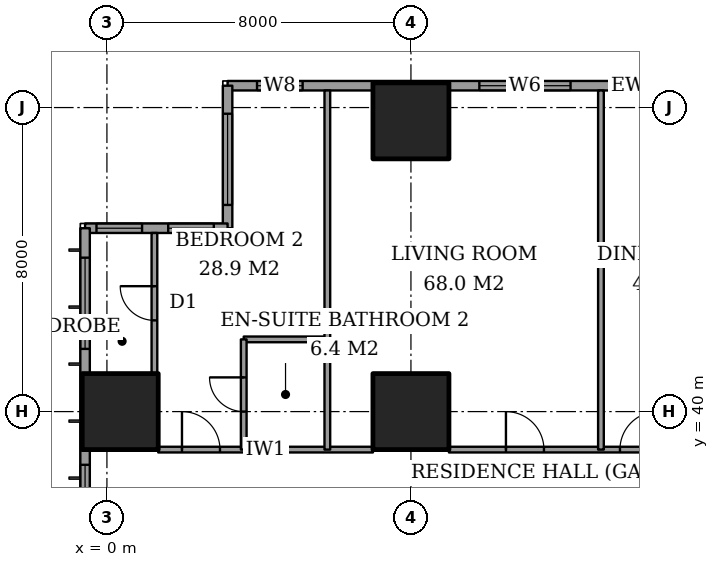
"""IFC4 building model, lengths in metres.
Left out: names, types, materials, properties, quantities, classifications, styles, units other than length and angle.
Written with IfcOpenShell. Run it as: python <this file> out.ifc"""

import sys

from ifc_helpers import new_model, si_unit, direction, frame, frame_2d, origin, origin_2d, place, context, subcontext, project, spatial, rectangle, extrude, element, fill, save


model = new_model("IFC4")
c1 = context("Model", 3, precision=1e-05, world=origin(), true_north=direction((0.0, 1.0)))
c2 = subcontext(c1, "Body", "Model", "MODEL_VIEW")
j1 = project(units=[si_unit("LENGTHUNIT", "METRE"), si_unit("PLANEANGLEUNIT", "RADIAN")], contexts=[c1])
p1 = place(None, origin())
s1 = spatial("IfcSite", under=j1, at=p1, CompositionType="ELEMENT")
p2 = place(p1, origin())
s2 = spatial("IfcBuilding", under=s1, at=p2, CompositionType="ELEMENT")
p3 = place(p2, frame((0.0, 0.0, 29.6)))
s3 = spatial("IfcBuildingStorey", under=s2, at=p3, CompositionType="ELEMENT", Elevation=29.6)
for number, where, z_axis, x_axis in (
    (1, (0.35, 40.0, 0.0), (0.0, 0.0, 1.0), (1.0, 0.0, 0.0)),
    (2, (8.0, 40.0, 0.0), (0.0, 0.0, 1.0), (1.0, 0.0, 0.0)),
    (3, (8.0, 47.65, 0.0), (0.0, 0.0, 1.0), (1.0, 0.0, 0.0)),
):
    element("IfcColumn", number, at=place(p3, frame(where, z_axis=z_axis, x_axis=x_axis)), inside=s3, PredefinedType="COLUMN", context=c2, shape_type="SweptSolid", body=[
        extrude(rectangle(XDim=2.0, YDim=2.0, at=origin_2d()), origin(), (0.0, 0.0, 1.0), 3.6),
    ])
p4 = place(p3, frame((24.575, 48.575, 0.0), z_axis=(0.0, 0.0, 1.0), x_axis=(-1.0, 0.0, 0.0)))
e4 = element("IfcWall", 4, at=p4, inside=s3, PredefinedType="SOLIDWALL", context=c2, shape_type="SweptSolid", body=[
    extrude(rectangle(XDim=21.4, YDim=0.25, at=frame_2d((10.7, 0.0))), origin(), (0.0, 0.0, 1.0), 3.6),
])
p5 = place(p4, frame((3.125, 0.0, 0.6)))
e5 = element("IfcOpeningElement", 5, at=p5, cuts=e4, PredefinedType="OPENING", context=c2, shape_type="SweptSolid", body=[
    extrude(rectangle(XDim=2.4, YDim=2.0, at=frame_2d((1.2, 1.0))), frame((0.0, 0.135, 0.0), z_axis=(0.0, -1.0, 0.0), x_axis=(1.0, 0.0, 0.0)), (0.0, 0.0, 1.0), 0.27),
])
p6 = place(p4, frame((9.975, 0.0, 0.6)))
e6 = element("IfcOpeningElement", 6, at=p6, cuts=e4, PredefinedType="OPENING", context=c2, shape_type="SweptSolid", body=[
    extrude(rectangle(XDim=1.2, YDim=2.0, at=frame_2d((0.6, 1.0))), frame((0.0, 0.135, 0.0), z_axis=(0.0, -1.0, 0.0), x_axis=(1.0, 0.0, 0.0)), (0.0, 0.0, 1.0), 0.27),
])
p7 = place(p4, frame((12.375, 0.0, 0.6)))
e7 = element("IfcOpeningElement", 7, at=p7, cuts=e4, PredefinedType="OPENING", context=c2, shape_type="SweptSolid", body=[
    extrude(rectangle(XDim=2.4, YDim=2.0, at=frame_2d((1.2, 1.0))), frame((0.0, 0.135, 0.0), z_axis=(0.0, -1.0, 0.0), x_axis=(1.0, 0.0, 0.0)), (0.0, 0.0, 1.0), 0.27),
])
p8 = place(p4, frame((19.425, 0.0, 0.6)))
e8 = element("IfcOpeningElement", 8, at=p8, cuts=e4, PredefinedType="OPENING", context=c2, shape_type="SweptSolid", body=[
    extrude(rectangle(XDim=1.2, YDim=2.0, at=frame_2d((0.6, 1.0))), frame((0.0, 0.135, 0.0), z_axis=(0.0, -1.0, 0.0), x_axis=(1.0, 0.0, 0.0)), (0.0, 0.0, 1.0), 0.27),
])
p9 = place(p3, frame((3.175, 48.575, 0.0), z_axis=(0.0, 0.0, 1.0), x_axis=(0.0, -1.0, 0.0)))
e9 = element("IfcWall", 9, at=p9, inside=s3, PredefinedType="SOLIDWALL", context=c2, shape_type="SweptSolid", body=[
    extrude(rectangle(XDim=3.75, YDim=0.25, at=frame_2d((1.875, 0.0))), origin(), (0.0, 0.0, 1.0), 3.6),
])
p10 = place(p9, frame((0.738, 0.0, 0.6)))
e10 = element("IfcOpeningElement", 10, at=p10, cuts=e9, PredefinedType="OPENING", context=c2, shape_type="SweptSolid", body=[
    extrude(rectangle(XDim=2.4, YDim=2.0, at=frame_2d((1.2, 1.0))), frame((0.0, 0.135, 0.0), z_axis=(0.0, -1.0, 0.0), x_axis=(1.0, 0.0, 0.0)), (0.0, 0.0, 1.0), 0.27),
])
p11 = place(p3, frame((3.175, 44.825, 0.0), z_axis=(0.0, 0.0, 1.0), x_axis=(-1.0, 0.0, 0.0)))
e11 = element("IfcWall", 11, at=p11, inside=s3, PredefinedType="SOLIDWALL", context=c2, shape_type="SweptSolid", body=[
    extrude(rectangle(XDim=3.75, YDim=0.25, at=frame_2d((1.875, 0.0))), origin(), (0.0, 0.0, 1.0), 3.6),
])
p12 = place(p11, frame((0.363, 0.0, 0.6)))
e12 = element("IfcOpeningElement", 12, at=p12, cuts=e11, PredefinedType="OPENING", context=c2, shape_type="SweptSolid", body=[
    extrude(rectangle(XDim=1.2, YDim=2.0, at=frame_2d((0.6, 1.0))), frame((0.0, 0.135, 0.0), z_axis=(0.0, -1.0, 0.0), x_axis=(1.0, 0.0, 0.0)), (0.0, 0.0, 1.0), 0.27),
])
p13 = place(p11, frame((2.25, 0.0, 0.6)))
e13 = element("IfcOpeningElement", 13, at=p13, cuts=e11, PredefinedType="OPENING", context=c2, shape_type="SweptSolid", body=[
    extrude(rectangle(XDim=1.2, YDim=2.0, at=frame_2d((0.6, 1.0))), frame((0.0, 0.135, 0.0), z_axis=(0.0, -1.0, 0.0), x_axis=(1.0, 0.0, 0.0)), (0.0, 0.0, 1.0), 0.27),
])
p14 = place(p3, frame((-0.575, 44.825, 0.0), z_axis=(0.0, 0.0, 1.0), x_axis=(0.0, -1.0, 0.0)))
e14 = element("IfcWall", 14, at=p14, inside=s3, PredefinedType="SOLIDWALL", context=c2, shape_type="SweptSolid", body=[
    extrude(rectangle(XDim=41.65, YDim=0.25, at=frame_2d((20.825, 0.0))), origin(), (0.0, 0.0, 1.0), 3.6),
])
p15 = place(p14, frame((0.775, 0.0, 0.6)))
e15 = element("IfcOpeningElement", 15, at=p15, cuts=e14, PredefinedType="OPENING", context=c2, shape_type="SweptSolid", body=[
    extrude(rectangle(XDim=2.4, YDim=2.0, at=frame_2d((1.2, 1.0))), frame((0.0, 0.135, 0.0), z_axis=(0.0, -1.0, 0.0), x_axis=(1.0, 0.0, 0.0)), (0.0, 0.0, 1.0), 0.27),
])
p16 = place(p14, frame((6.225, 0.0, 0.6)))
e16 = element("IfcOpeningElement", 16, at=p16, cuts=e14, PredefinedType="OPENING", context=c2, shape_type="SweptSolid", body=[
    extrude(rectangle(XDim=1.2, YDim=2.0, at=frame_2d((0.6, 1.0))), frame((0.0, 0.135, 0.0), z_axis=(0.0, -1.0, 0.0), x_axis=(1.0, 0.0, 0.0)), (0.0, 0.0, 1.0), 0.27),
])
p17 = place(p14, frame((8.625, 0.0, 0.6)))
e17 = element("IfcOpeningElement", 17, at=p17, cuts=e14, PredefinedType="OPENING", context=c2, shape_type="SweptSolid", body=[
    extrude(rectangle(XDim=2.4, YDim=2.0, at=frame_2d((1.2, 1.0))), frame((0.0, 0.135, 0.0), z_axis=(0.0, -1.0, 0.0), x_axis=(1.0, 0.0, 0.0)), (0.0, 0.0, 1.0), 0.27),
])
p18 = place(p14, frame((15.625, 0.0, 0.6)))
e18 = element("IfcOpeningElement", 18, at=p18, cuts=e14, PredefinedType="OPENING", context=c2, shape_type="SweptSolid", body=[
    extrude(rectangle(XDim=2.4, YDim=2.0, at=frame_2d((1.2, 1.0))), frame((0.0, 0.135, 0.0), z_axis=(0.0, -1.0, 0.0), x_axis=(1.0, 0.0, 0.0)), (0.0, 0.0, 1.0), 0.27),
])
p19 = place(p14, frame((23.625, 0.0, 0.6)))
e19 = element("IfcOpeningElement", 19, at=p19, cuts=e14, PredefinedType="OPENING", context=c2, shape_type="SweptSolid", body=[
    extrude(rectangle(XDim=2.4, YDim=2.0, at=frame_2d((1.2, 1.0))), frame((0.0, 0.135, 0.0), z_axis=(0.0, -1.0, 0.0), x_axis=(1.0, 0.0, 0.0)), (0.0, 0.0, 1.0), 0.27),
])
p20 = place(p14, frame((30.825, 0.0, 0.6)))
e20 = element("IfcOpeningElement", 20, at=p20, cuts=e14, PredefinedType="OPENING", context=c2, shape_type="SweptSolid", body=[
    extrude(rectangle(XDim=2.4, YDim=2.0, at=frame_2d((1.2, 1.0))), frame((0.0, 0.135, 0.0), z_axis=(0.0, -1.0, 0.0), x_axis=(1.0, 0.0, 0.0)), (0.0, 0.0, 1.0), 0.27),
])
p21 = place(p14, frame((34.5, 0.0, 0.6)))
e21 = element("IfcOpeningElement", 21, at=p21, cuts=e14, PredefinedType="OPENING", context=c2, shape_type="SweptSolid", body=[
    extrude(rectangle(XDim=1.2, YDim=2.0, at=frame_2d((0.6, 1.0))), frame((0.0, 0.135, 0.0), z_axis=(0.0, -1.0, 0.0), x_axis=(1.0, 0.0, 0.0)), (0.0, 0.0, 1.0), 0.27),
])
p22 = place(p14, frame((38.475, 0.0, 0.6)))
e22 = element("IfcOpeningElement", 22, at=p22, cuts=e14, PredefinedType="OPENING", context=c2, shape_type="SweptSolid", body=[
    extrude(rectangle(XDim=2.4, YDim=2.0, at=frame_2d((1.2, 1.0))), frame((0.0, 0.135, 0.0), z_axis=(0.0, -1.0, 0.0), x_axis=(1.0, 0.0, 0.0)), (0.0, 0.0, 1.0), 0.27),
])
p23 = place(p3, frame((1.35, 39.0, 0.0), z_axis=(0.0, 0.0, 1.0), x_axis=(1.0, 0.0, 0.0)))
e23 = element("IfcWall", 23, at=p23, inside=s3, PredefinedType="PARTITIONING", context=c2, shape_type="SweptSolid", body=[
    extrude(rectangle(XDim=5.65, YDim=0.15, at=frame_2d((2.825, 0.0))), origin(), (0.0, 0.0, 1.0), 3.35),
])
p24 = place(p23, frame((0.625, 0.0, 0.0)))
e24 = element("IfcOpeningElement", 24, at=p24, cuts=e23, PredefinedType="OPENING", context=c2, shape_type="SweptSolid", body=[
    extrude(rectangle(XDim=1.0, YDim=2.1, at=frame_2d((0.5, 1.05))), frame((0.0, 0.085, 0.0), z_axis=(0.0, -1.0, 0.0), x_axis=(1.0, 0.0, 0.0)), (0.0, 0.0, 1.0), 0.17),
])
p25 = place(p3, frame((9.0, 39.0, 0.0), z_axis=(0.0, 0.0, 1.0), x_axis=(1.0, 0.0, 0.0)))
e25 = element("IfcWall", 25, at=p25, inside=s3, PredefinedType="PARTITIONING", context=c2, shape_type="SweptSolid", body=[
    extrude(rectangle(XDim=6.0, YDim=0.15, at=frame_2d((3.0, 0.0))), origin(), (0.0, 0.0, 1.0), 3.35),
])
p26 = place(p25, frame((1.5, 0.0, 0.0)))
e26 = element("IfcOpeningElement", 26, at=p26, cuts=e25, PredefinedType="OPENING", context=c2, shape_type="SweptSolid", body=[
    extrude(rectangle(XDim=1.0, YDim=2.1, at=frame_2d((0.5, 1.05))), frame((0.0, 0.085, 0.0), z_axis=(0.0, -1.0, 0.0), x_axis=(1.0, 0.0, 0.0)), (0.0, 0.0, 1.0), 0.17),
])
p27 = place(p25, frame((4.5, 0.0, 0.0)))
e27 = element("IfcOpeningElement", 27, at=p27, cuts=e25, PredefinedType="OPENING", context=c2, shape_type="SweptSolid", body=[
    extrude(rectangle(XDim=1.0, YDim=2.1, at=frame_2d((0.5, 1.05))), frame((0.0, 0.085, 0.0), z_axis=(0.0, -1.0, 0.0), x_axis=(1.0, 0.0, 0.0)), (0.0, 0.0, 1.0), 0.17),
])
p28 = place(p3, frame((3.6, 41.9, 0.0), z_axis=(0.0, 0.0, 1.0), x_axis=(1.0, 0.0, 0.0)))
e28 = element("IfcWall", 28, at=p28, inside=s3, PredefinedType="PARTITIONING", context=c2, shape_type="SweptSolid", body=[
    extrude(rectangle(XDim=2.2, YDim=0.15, at=frame_2d((1.1, 0.0))), origin(), (0.0, 0.0, 1.0), 3.35),
])
p29 = place(p3, frame((1.25, 41.0, 0.0), z_axis=(0.0, 0.0, 1.0), x_axis=(0.0, 1.0, 0.0)))
e29 = element("IfcWall", 29, at=p29, inside=s3, PredefinedType="PARTITIONING", context=c2, shape_type="SweptSolid", body=[
    extrude(rectangle(XDim=3.7, YDim=0.15, at=frame_2d((1.85, 0.0))), origin(), (0.0, 0.0, 1.0), 3.35),
])
p30 = place(p29, frame((1.4, 0.0, 0.0)))
e30 = element("IfcOpeningElement", 30, at=p30, cuts=e29, PredefinedType="OPENING", context=c2, shape_type="SweptSolid", body=[
    extrude(rectangle(XDim=0.9, YDim=2.1, at=frame_2d((0.45, 1.05))), frame((0.0, 0.085, 0.0), z_axis=(0.0, -1.0, 0.0), x_axis=(1.0, 0.0, 0.0)), (0.0, 0.0, 1.0), 0.17),
])
p31 = place(p3, frame((3.6, 39.0, 0.0), z_axis=(0.0, 0.0, 1.0), x_axis=(0.0, 1.0, 0.0)))
e31 = element("IfcWall", 31, at=p31, inside=s3, PredefinedType="PARTITIONING", context=c2, shape_type="SweptSolid", body=[
    extrude(rectangle(XDim=2.9, YDim=0.15, at=frame_2d((1.45, 0.0))), origin(), (0.0, 0.0, 1.0), 3.35),
])
p32 = place(p31, frame((1.0, 0.0, 0.0)))
e32 = element("IfcOpeningElement", 32, at=p32, cuts=e31, PredefinedType="OPENING", context=c2, shape_type="SweptSolid", body=[
    extrude(rectangle(XDim=0.9, YDim=2.1, at=frame_2d((0.45, 1.05))), frame((0.0, 0.085, 0.0), z_axis=(0.0, -1.0, 0.0), x_axis=(1.0, 0.0, 0.0)), (0.0, 0.0, 1.0), 0.17),
])
for number, where, z_axis, x_axis in (
    (33, (5.8, 39.0, 0.0), (0.0, 0.0, 1.0), (0.0, 1.0, 0.0)),
    (34, (13.0, 39.0, 0.0), (0.0, 0.0, 1.0), (0.0, 1.0, 0.0)),
):
    element("IfcWall", number, at=place(p3, frame(where, z_axis=z_axis, x_axis=x_axis)), inside=s3, PredefinedType="PARTITIONING", context=c2, shape_type="SweptSolid", body=[
        extrude(rectangle(XDim=9.45, YDim=0.15, at=frame_2d((4.725, 0.0))), origin(), (0.0, 0.0, 1.0), 3.35),
    ])
p33 = place(p6, origin())
e35 = element("IfcWindow", 35, at=p33, inside=s3, PartitioningType="SINGLE_PANEL", PredefinedType="WINDOW", context=c2, shape_type="SweptSolid", body=[
    extrude(rectangle(XDim=1.2, YDim=2.0, at=frame_2d((0.6, 1.0))), frame((0.0, 0.03, 0.0), z_axis=(0.0, -1.0, 0.0), x_axis=(1.0, 0.0, 0.0)), (0.0, 0.0, 1.0), 0.06),
])
fill(e6, e35)
p34 = place(p7, origin())
e36 = element("IfcWindow", 36, at=p34, inside=s3, PartitioningType="SINGLE_PANEL", PredefinedType="WINDOW", context=c2, shape_type="SweptSolid", body=[
    extrude(rectangle(XDim=2.4, YDim=2.0, at=frame_2d((1.2, 1.0))), frame((0.0, 0.03, 0.0), z_axis=(0.0, -1.0, 0.0), x_axis=(1.0, 0.0, 0.0)), (0.0, 0.0, 1.0), 0.06),
])
fill(e7, e36)
p35 = place(p8, origin())
e37 = element("IfcWindow", 37, at=p35, inside=s3, PartitioningType="SINGLE_PANEL", PredefinedType="WINDOW", context=c2, shape_type="SweptSolid", body=[
    extrude(rectangle(XDim=1.2, YDim=2.0, at=frame_2d((0.6, 1.0))), frame((0.0, 0.03, 0.0), z_axis=(0.0, -1.0, 0.0), x_axis=(1.0, 0.0, 0.0)), (0.0, 0.0, 1.0), 0.06),
])
fill(e8, e37)
p36 = place(p10, origin())
e38 = element("IfcWindow", 38, at=p36, inside=s3, PartitioningType="SINGLE_PANEL", PredefinedType="WINDOW", context=c2, shape_type="SweptSolid", body=[
    extrude(rectangle(XDim=2.4, YDim=2.0, at=frame_2d((1.2, 1.0))), frame((0.0, 0.03, 0.0), z_axis=(0.0, -1.0, 0.0), x_axis=(1.0, 0.0, 0.0)), (0.0, 0.0, 1.0), 0.06),
])
fill(e10, e38)
p37 = place(p12, origin())
e39 = element("IfcWindow", 39, at=p37, inside=s3, PartitioningType="SINGLE_PANEL", PredefinedType="WINDOW", context=c2, shape_type="SweptSolid", body=[
    extrude(rectangle(XDim=1.2, YDim=2.0, at=frame_2d((0.6, 1.0))), frame((0.0, 0.03, 0.0), z_axis=(0.0, -1.0, 0.0), x_axis=(1.0, 0.0, 0.0)), (0.0, 0.0, 1.0), 0.06),
])
fill(e12, e39)
p38 = place(p13, origin())
e40 = element("IfcWindow", 40, at=p38, inside=s3, PartitioningType="SINGLE_PANEL", PredefinedType="WINDOW", context=c2, shape_type="SweptSolid", body=[
    extrude(rectangle(XDim=1.2, YDim=2.0, at=frame_2d((0.6, 1.0))), frame((0.0, 0.03, 0.0), z_axis=(0.0, -1.0, 0.0), x_axis=(1.0, 0.0, 0.0)), (0.0, 0.0, 1.0), 0.06),
])
fill(e13, e40)
p39 = place(p15, origin())
e41 = element("IfcWindow", 41, at=p39, inside=s3, PartitioningType="SINGLE_PANEL", PredefinedType="WINDOW", context=c2, shape_type="SweptSolid", body=[
    extrude(rectangle(XDim=2.4, YDim=2.0, at=frame_2d((1.2, 1.0))), frame((0.0, 0.03, 0.0), z_axis=(0.0, -1.0, 0.0), x_axis=(1.0, 0.0, 0.0)), (0.0, 0.0, 1.0), 0.06),
])
fill(e15, e41)
p40 = place(p16, origin())
e42 = element("IfcWindow", 42, at=p40, inside=s3, PartitioningType="SINGLE_PANEL", PredefinedType="WINDOW", context=c2, shape_type="SweptSolid", body=[
    extrude(rectangle(XDim=1.2, YDim=2.0, at=frame_2d((0.6, 1.0))), frame((0.0, 0.03, 0.0), z_axis=(0.0, -1.0, 0.0), x_axis=(1.0, 0.0, 0.0)), (0.0, 0.0, 1.0), 0.06),
])
fill(e16, e42)
p41 = place(p30, origin())
e43 = element("IfcDoor", 43, at=p41, inside=s3, OperationType="SINGLE_SWING_LEFT", PredefinedType="DOOR", context=c2, shape_type="SweptSolid", body=[
    extrude(rectangle(XDim=0.9, YDim=2.1, at=frame_2d((0.45, 1.05))), frame((0.0, 0.025, 0.0), z_axis=(0.0, -1.0, 0.0), x_axis=(1.0, 0.0, 0.0)), (0.0, 0.0, 1.0), 0.05),
])
fill(e30, e43)
p42 = place(p32, origin())
e44 = element("IfcDoor", 44, at=p42, inside=s3, OperationType="SINGLE_SWING_LEFT", PredefinedType="DOOR", context=c2, shape_type="SweptSolid", body=[
    extrude(rectangle(XDim=0.9, YDim=2.1, at=frame_2d((0.45, 1.05))), frame((0.0, 0.025, 0.0), z_axis=(0.0, -1.0, 0.0), x_axis=(1.0, 0.0, 0.0)), (0.0, 0.0, 1.0), 0.05),
])
fill(e32, e44)
p43 = place(p24, origin())
e45 = element("IfcDoor", 45, at=p43, inside=s3, OperationType="SINGLE_SWING_RIGHT", PredefinedType="DOOR", context=c2, shape_type="SweptSolid", body=[
    extrude(rectangle(XDim=1.0, YDim=2.1, at=frame_2d((0.5, 1.05))), frame((0.0, 0.025, 0.0), z_axis=(0.0, -1.0, 0.0), x_axis=(1.0, 0.0, 0.0)), (0.0, 0.0, 1.0), 0.05),
])
fill(e24, e45)
p44 = place(p26, origin())
e46 = element("IfcDoor", 46, at=p44, inside=s3, OperationType="SINGLE_SWING_RIGHT", PredefinedType="DOOR", context=c2, shape_type="SweptSolid", body=[
    extrude(rectangle(XDim=1.0, YDim=2.1, at=frame_2d((0.5, 1.05))), frame((0.0, 0.025, 0.0), z_axis=(0.0, -1.0, 0.0), x_axis=(1.0, 0.0, 0.0)), (0.0, 0.0, 1.0), 0.05),
])
fill(e26, e46)
p45 = place(p27, origin())
e47 = element("IfcDoor", 47, at=p45, inside=s3, OperationType="SINGLE_SWING_LEFT", PredefinedType="DOOR", context=c2, shape_type="SweptSolid", body=[
    extrude(rectangle(XDim=1.0, YDim=2.1, at=frame_2d((0.5, 1.05))), frame((0.0, 0.025, 0.0), z_axis=(0.0, -1.0, 0.0), x_axis=(1.0, 0.0, 0.0)), (0.0, 0.0, 1.0), 0.05),
])
fill(e27, e47)
save(model, sys.argv[1])
